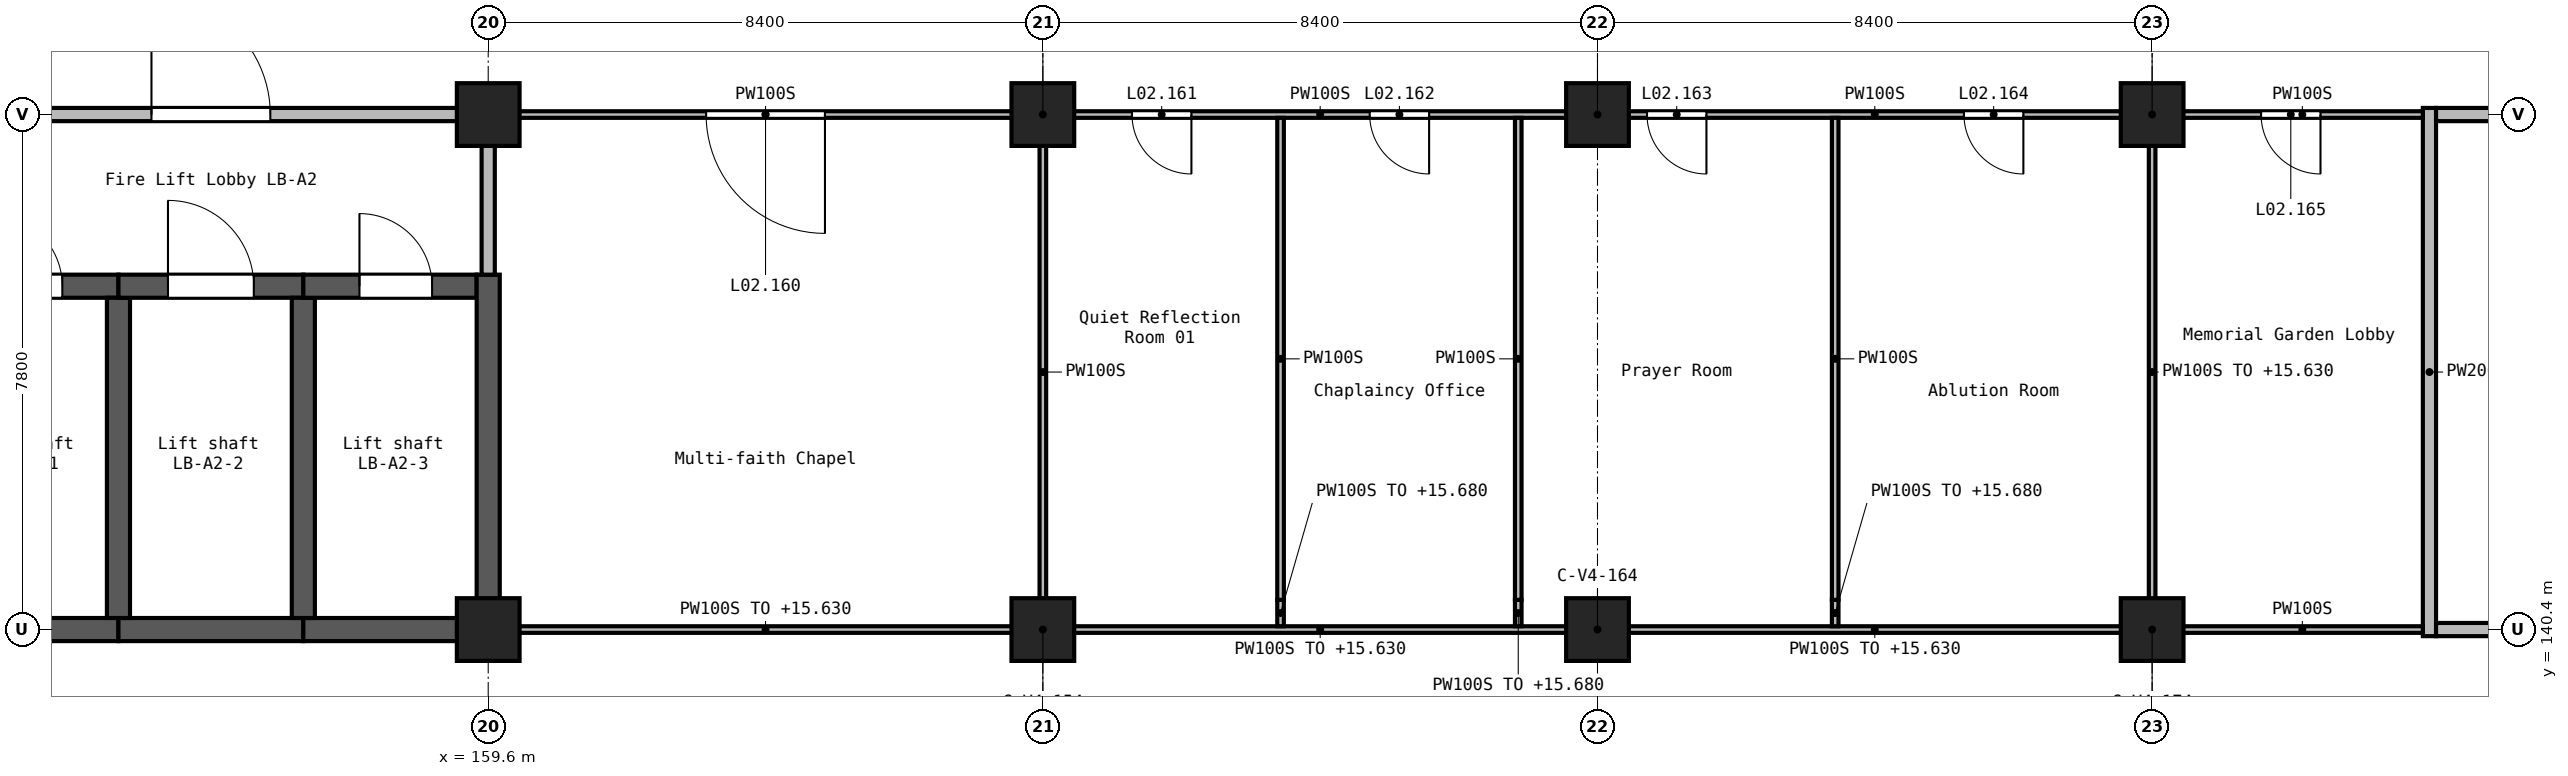
"""IFC4 building model, lengths in metres.
Left out: names, types, materials, properties, quantities, classifications, styles, units other than length and angle.
Written with IfcOpenShell. Run it as: python <this file> out.ifc"""

import sys

from ifc_helpers import new_model, si_unit, direction, frame, frame_2d, origin, origin_2d, place, context, subcontext, project, spatial, rectangle, extrude, element, fill, save


model = new_model("IFC4")
c1 = context("Model", 3, precision=1e-05, world=origin(), true_north=direction((0.0, 1.0)))
c2 = subcontext(c1, "Body", "Model", "MODEL_VIEW")
j1 = project(units=[si_unit("LENGTHUNIT", "METRE"), si_unit("PLANEANGLEUNIT", "RADIAN")], contexts=[c1])
p1 = place(None, origin())
s1 = spatial("IfcSite", under=j1, at=p1, CompositionType="ELEMENT")
p2 = place(p1, origin())
s2 = spatial("IfcBuilding", under=s1, at=p2, CompositionType="ELEMENT")
p3 = place(p2, frame((0.0, 0.0, 12.6)))
s3 = spatial("IfcBuildingStorey", under=s2, at=p3, CompositionType="ELEMENT", Elevation=12.6)
for number, where, z_axis, x_axis in (
    (1, (159.6, 140.4, 0.0), (0.0, 0.0, 1.0), (1.0, 0.0, 0.0)),
    (2, (159.6, 148.2, 0.0), (0.0, 0.0, 1.0), (1.0, 0.0, 0.0)),
    (3, (168.0, 140.4, 0.0), (0.0, 0.0, 1.0), (1.0, 0.0, 0.0)),
    (4, (168.0, 148.2, 0.0), (0.0, 0.0, 1.0), (1.0, 0.0, 0.0)),
    (5, (176.4, 140.4, 0.0), (0.0, 0.0, 1.0), (1.0, 0.0, 0.0)),
    (6, (176.4, 148.2, 0.0), (0.0, 0.0, 1.0), (1.0, 0.0, 0.0)),
    (7, (184.8, 140.4, 0.0), (0.0, 0.0, 1.0), (1.0, 0.0, 0.0)),
    (8, (184.8, 148.2, 0.0), (0.0, 0.0, 1.0), (1.0, 0.0, 0.0)),
):
    element("IfcColumn", number, at=place(p3, frame(where, z_axis=z_axis, x_axis=x_axis)), inside=s3, PredefinedType="COLUMN", context=c2, shape_type="SweptSolid", body=[
        extrude(rectangle(XDim=0.95, YDim=0.95, at=origin_2d()), origin(), (0.0, 0.0, 1.0), 4.2),
    ])
p4 = place(p3, frame((151.025, 145.6, 0.0), z_axis=(0.0, 0.0, 1.0), x_axis=(1.0, 0.0, 0.0)))
e9 = element("IfcWall", 9, at=p4, inside=s3, PredefinedType="SHEAR", context=c2, shape_type="SweptSolid", body=[
    extrude(rectangle(XDim=2.975, YDim=0.35, at=frame_2d((1.488, 0.0))), origin(), (0.0, 0.0, 1.0), 4.2),
])
p5 = place(p4, frame((1.025, 0.0, 0.0)))
e10 = element("IfcOpeningElement", 10, at=p5, cuts=e9, PredefinedType="OPENING", context=c2, shape_type="SweptSolid", body=[
    extrude(rectangle(XDim=1.1, YDim=2.1, at=frame_2d((0.55, 1.05))), frame((0.0, 0.185, 0.0), z_axis=(0.0, -1.0, 0.0), x_axis=(1.0, 0.0, 0.0)), (0.0, 0.0, 1.0), 0.37),
])
p6 = place(p3, frame((151.375, 140.4, 0.0), z_axis=(0.0, 0.0, 1.0), x_axis=(1.0, 0.0, 0.0)))
e11 = element("IfcWall", 11, at=p6, inside=s3, PredefinedType="SHEAR", context=c2, shape_type="SweptSolid", body=[
    extrude(rectangle(XDim=2.625, YDim=0.35, at=frame_2d((1.312, 0.0))), origin(), (0.0, 0.0, 1.0), 4.2),
])
p7 = place(p3, frame((154.0, 140.4, 0.0), z_axis=(0.0, 0.0, 1.0), x_axis=(1.0, 0.0, 0.0)))
e12 = element("IfcWall", 12, at=p7, inside=s3, PredefinedType="SHEAR", context=c2, shape_type="SweptSolid", body=[
    extrude(rectangle(XDim=2.8, YDim=0.35, at=frame_2d((1.4, 0.0))), origin(), (0.0, 0.0, 1.0), 4.2),
])
p8 = place(p3, frame((154.0, 140.575, 0.0), z_axis=(0.0, 0.0, 1.0), x_axis=(0.0, 1.0, 0.0)))
e13 = element("IfcWall", 13, at=p8, inside=s3, PredefinedType="SHEAR", context=c2, shape_type="SweptSolid", body=[
    extrude(rectangle(XDim=4.85, YDim=0.35, at=frame_2d((2.425, 0.0))), origin(), (0.0, 0.0, 1.0), 4.2),
])
p9 = place(p3, frame((154.0, 145.6, 0.0), z_axis=(0.0, 0.0, 1.0), x_axis=(1.0, 0.0, 0.0)))
e14 = element("IfcWall", 14, at=p9, inside=s3, PredefinedType="SHEAR", context=c2, shape_type="SweptSolid", body=[
    extrude(rectangle(XDim=2.8, YDim=0.35, at=frame_2d((1.4, 0.0))), origin(), (0.0, 0.0, 1.0), 4.2),
])
p10 = place(p9, frame((0.75, 0.0, 0.0)))
e15 = element("IfcOpeningElement", 15, at=p10, cuts=e14, PredefinedType="OPENING", context=c2, shape_type="SweptSolid", body=[
    extrude(rectangle(XDim=1.3, YDim=2.1, at=frame_2d((0.65, 1.05))), frame((0.0, 0.185, 0.0), z_axis=(0.0, -1.0, 0.0), x_axis=(1.0, 0.0, 0.0)), (0.0, 0.0, 1.0), 0.37),
])
p11 = place(p3, frame((156.8, 140.4, 0.0), z_axis=(0.0, 0.0, 1.0), x_axis=(1.0, 0.0, 0.0)))
e16 = element("IfcWall", 16, at=p11, inside=s3, PredefinedType="SHEAR", context=c2, shape_type="SweptSolid", body=[
    extrude(rectangle(XDim=2.625, YDim=0.35, at=frame_2d((1.312, 0.0))), origin(), (0.0, 0.0, 1.0), 4.2),
])
p12 = place(p3, frame((156.8, 140.575, 0.0), z_axis=(0.0, 0.0, 1.0), x_axis=(0.0, 1.0, 0.0)))
e17 = element("IfcWall", 17, at=p12, inside=s3, PredefinedType="SHEAR", context=c2, shape_type="SweptSolid", body=[
    extrude(rectangle(XDim=4.85, YDim=0.35, at=frame_2d((2.425, 0.0))), origin(), (0.0, 0.0, 1.0), 4.2),
])
p13 = place(p3, frame((156.8, 145.6, 0.0), z_axis=(0.0, 0.0, 1.0), x_axis=(1.0, 0.0, 0.0)))
e18 = element("IfcWall", 18, at=p13, inside=s3, PredefinedType="SHEAR", context=c2, shape_type="SweptSolid", body=[
    extrude(rectangle(XDim=2.625, YDim=0.35, at=frame_2d((1.312, 0.0))), origin(), (0.0, 0.0, 1.0), 4.2),
])
p14 = place(p13, frame((0.85, 0.0, 0.0)))
e19 = element("IfcOpeningElement", 19, at=p14, cuts=e18, PredefinedType="OPENING", context=c2, shape_type="SweptSolid", body=[
    extrude(rectangle(XDim=1.1, YDim=2.1, at=frame_2d((0.55, 1.05))), frame((0.0, 0.185, 0.0), z_axis=(0.0, -1.0, 0.0), x_axis=(1.0, 0.0, 0.0)), (0.0, 0.0, 1.0), 0.37),
])
p15 = place(p3, frame((159.6, 140.225, 0.0), z_axis=(0.0, 0.0, 1.0), x_axis=(0.0, 1.0, 0.0)))
e20 = element("IfcWall", 20, at=p15, inside=s3, PredefinedType="SHEAR", context=c2, shape_type="SweptSolid", body=[
    extrude(rectangle(XDim=5.55, YDim=0.35, at=frame_2d((2.775, 0.0))), origin(), (0.0, 0.0, 1.0), 4.2),
])
p16 = place(p3, frame((151.65, 148.2, 0.0), z_axis=(0.0, 0.0, 1.0), x_axis=(1.0, 0.0, 0.0)))
e21 = element("IfcWall", 21, at=p16, inside=s3, PredefinedType="SOLIDWALL", context=c2, shape_type="SweptSolid", body=[
    extrude(rectangle(XDim=7.5, YDim=0.2, at=frame_2d((3.75, 0.0))), origin(), (0.0, 0.0, 1.0), 3.85),
])
p17 = place(p16, frame((2.85, 0.0, 0.0)))
e22 = element("IfcOpeningElement", 22, at=p17, cuts=e21, PredefinedType="OPENING", context=c2, shape_type="SweptSolid", body=[
    extrude(rectangle(XDim=1.8, YDim=2.1, at=frame_2d((0.9, 1.05))), frame((0.0, 0.11, 0.0), z_axis=(0.0, -1.0, 0.0), x_axis=(1.0, 0.0, 0.0)), (0.0, 0.0, 1.0), 0.22),
])
p18 = place(p3, frame((189.0, 140.3, 0.0), z_axis=(0.0, 0.0, 1.0), x_axis=(0.0, 1.0, 0.0)))
e23 = element("IfcWall", 23, at=p18, inside=s3, PredefinedType="SOLIDWALL", context=c2, shape_type="SweptSolid", body=[
    extrude(rectangle(XDim=8.0, YDim=0.2, at=frame_2d((4.0, 0.0))), origin(), (0.0, 0.0, 1.0), 3.85),
])
p19 = place(p3, frame((189.1, 140.4, 0.0), z_axis=(0.0, 0.0, 1.0), x_axis=(1.0, 0.0, 0.0)))
e24 = element("IfcWall", 24, at=p19, inside=s3, PredefinedType="SOLIDWALL", context=c2, shape_type="SweptSolid", body=[
    extrude(rectangle(XDim=3.65, YDim=0.2, at=frame_2d((1.825, 0.0))), origin(), (0.0, 0.0, 1.0), 3.85),
])
p20 = place(p3, frame((189.1, 148.2, 0.0), z_axis=(0.0, 0.0, 1.0), x_axis=(1.0, 0.0, 0.0)))
e25 = element("IfcWall", 25, at=p20, inside=s3, PredefinedType="SOLIDWALL", context=c2, shape_type="SweptSolid", body=[
    extrude(rectangle(XDim=3.65, YDim=0.2, at=frame_2d((1.825, 0.0))), origin(), (0.0, 0.0, 1.0), 3.85),
])
p21 = place(p20, frame((1.5, 0.0, 0.0)))
e26 = element("IfcOpeningElement", 26, at=p21, cuts=e25, PredefinedType="OPENING", context=c2, shape_type="SweptSolid", body=[
    extrude(rectangle(XDim=1.0, YDim=2.1, at=frame_2d((0.5, 1.05))), frame((0.0, 0.11, 0.0), z_axis=(0.0, -1.0, 0.0), x_axis=(1.0, 0.0, 0.0)), (0.0, 0.0, 1.0), 0.22),
])
p22 = place(p3, frame((159.6, 145.775, 0.0), z_axis=(0.0, 0.0, 1.0), x_axis=(0.0, 1.0, 0.0)))
e27 = element("IfcWall", 27, at=p22, inside=s3, PredefinedType="SOLIDWALL", context=c2, shape_type="SweptSolid", body=[
    extrude(rectangle(XDim=1.975, YDim=0.2, at=frame_2d((0.988, 0.0))), origin(), (0.0, 0.0, 1.0), 3.85),
])
p23 = place(p3, frame((188.9, 140.4, 0.0), z_axis=(0.0, 0.0, 1.0), x_axis=(-1.0, 0.0, 0.0)))
e28 = element("IfcWall", 28, at=p23, inside=s3, PredefinedType="PARTITIONING", context=c2, shape_type="SweptSolid", body=[
    extrude(rectangle(XDim=3.65, YDim=0.1, at=frame_2d((1.825, 0.0))), origin(), (0.0, 0.0, 1.0), 3.85),
])
for number, where, z_axis, x_axis in (
    (29, (184.35, 140.4, 0.0), (0.0, 0.0, 1.0), (-1.0, 0.0, 0.0)),
    (30, (175.95, 140.4, 0.0), (0.0, 0.0, 1.0), (-1.0, 0.0, 0.0)),
    (31, (167.55, 140.4, 0.0), (0.0, 0.0, 1.0), (-1.0, 0.0, 0.0)),
):
    element("IfcWall", number, at=place(p3, frame(where, z_axis=z_axis, x_axis=x_axis)), inside=s3, PredefinedType="PARTITIONING", context=c2, shape_type="SweptSolid", body=[
        extrude(rectangle(XDim=7.5, YDim=0.1, at=frame_2d((3.75, 0.0))), origin(), (0.0, 0.0, 1.0), 3.03),
    ])
p24 = place(p3, frame((188.9, 148.2, 0.0), z_axis=(0.0, 0.0, 1.0), x_axis=(-1.0, 0.0, 0.0)))
e32 = element("IfcWall", 32, at=p24, inside=s3, PredefinedType="PARTITIONING", context=c2, shape_type="SweptSolid", body=[
    extrude(rectangle(XDim=3.65, YDim=0.1, at=frame_2d((1.825, 0.0))), origin(), (0.0, 0.0, 1.0), 3.85),
])
p25 = place(p24, frame((1.55, 0.0, 0.0)))
e33 = element("IfcOpeningElement", 33, at=p25, cuts=e32, PredefinedType="OPENING", context=c2, shape_type="SweptSolid", body=[
    extrude(rectangle(XDim=0.9, YDim=2.1, at=frame_2d((0.45, 1.05))), frame((0.0, 0.06, 0.0), z_axis=(0.0, -1.0, 0.0), x_axis=(1.0, 0.0, 0.0)), (0.0, 0.0, 1.0), 0.12),
])
p26 = place(p3, frame((184.35, 148.2, 0.0), z_axis=(0.0, 0.0, 1.0), x_axis=(-1.0, 0.0, 0.0)))
e34 = element("IfcWall", 34, at=p26, inside=s3, PredefinedType="PARTITIONING", context=c2, shape_type="SweptSolid", body=[
    extrude(rectangle(XDim=7.5, YDim=0.1, at=frame_2d((3.75, 0.0))), origin(), (0.0, 0.0, 1.0), 3.85),
])
p27 = place(p26, frame((6.3, 0.0, 0.0)))
e35 = element("IfcOpeningElement", 35, at=p27, cuts=e34, PredefinedType="OPENING", context=c2, shape_type="SweptSolid", body=[
    extrude(rectangle(XDim=0.9, YDim=2.1, at=frame_2d((0.45, 1.05))), frame((0.0, 0.06, 0.0), z_axis=(0.0, -1.0, 0.0), x_axis=(1.0, 0.0, 0.0)), (0.0, 0.0, 1.0), 0.12),
])
p28 = place(p26, frame((1.5, 0.0, 0.0)))
e36 = element("IfcOpeningElement", 36, at=p28, cuts=e34, PredefinedType="OPENING", context=c2, shape_type="SweptSolid", body=[
    extrude(rectangle(XDim=0.9, YDim=2.1, at=frame_2d((0.45, 1.05))), frame((0.0, 0.06, 0.0), z_axis=(0.0, -1.0, 0.0), x_axis=(1.0, 0.0, 0.0)), (0.0, 0.0, 1.0), 0.12),
])
p29 = place(p3, frame((175.95, 148.2, 0.0), z_axis=(0.0, 0.0, 1.0), x_axis=(-1.0, 0.0, 0.0)))
e37 = element("IfcWall", 37, at=p29, inside=s3, PredefinedType="PARTITIONING", context=c2, shape_type="SweptSolid", body=[
    extrude(rectangle(XDim=7.5, YDim=0.1, at=frame_2d((3.75, 0.0))), origin(), (0.0, 0.0, 1.0), 3.85),
])
p30 = place(p29, frame((5.7, 0.0, 0.0)))
e38 = element("IfcOpeningElement", 38, at=p30, cuts=e37, PredefinedType="OPENING", context=c2, shape_type="SweptSolid", body=[
    extrude(rectangle(XDim=0.9, YDim=2.1, at=frame_2d((0.45, 1.05))), frame((0.0, 0.06, 0.0), z_axis=(0.0, -1.0, 0.0), x_axis=(1.0, 0.0, 0.0)), (0.0, 0.0, 1.0), 0.12),
])
p31 = place(p29, frame((2.1, 0.0, 0.0)))
e39 = element("IfcOpeningElement", 39, at=p31, cuts=e37, PredefinedType="OPENING", context=c2, shape_type="SweptSolid", body=[
    extrude(rectangle(XDim=0.9, YDim=2.1, at=frame_2d((0.45, 1.05))), frame((0.0, 0.06, 0.0), z_axis=(0.0, -1.0, 0.0), x_axis=(1.0, 0.0, 0.0)), (0.0, 0.0, 1.0), 0.12),
])
p32 = place(p3, frame((167.55, 148.2, 0.0), z_axis=(0.0, 0.0, 1.0), x_axis=(-1.0, 0.0, 0.0)))
e40 = element("IfcWall", 40, at=p32, inside=s3, PredefinedType="PARTITIONING", context=c2, shape_type="SweptSolid", body=[
    extrude(rectangle(XDim=7.5, YDim=0.1, at=frame_2d((3.75, 0.0))), origin(), (0.0, 0.0, 1.0), 3.85),
])
p33 = place(p32, frame((2.85, 0.0, 0.0)))
e41 = element("IfcOpeningElement", 41, at=p33, cuts=e40, PredefinedType="OPENING", context=c2, shape_type="SweptSolid", body=[
    extrude(rectangle(XDim=1.8, YDim=2.1, at=frame_2d((0.9, 1.05))), frame((0.0, 0.06, 0.0), z_axis=(0.0, -1.0, 0.0), x_axis=(1.0, 0.0, 0.0)), (0.0, 0.0, 1.0), 0.12),
])
p34 = place(p3, frame((168.0, 140.85, 0.0), z_axis=(0.0, 0.0, 1.0), x_axis=(0.0, 1.0, 0.0)))
e42 = element("IfcWall", 42, at=p34, inside=s3, PredefinedType="PARTITIONING", context=c2, shape_type="SweptSolid", body=[
    extrude(rectangle(XDim=6.9, YDim=0.1, at=frame_2d((3.45, 0.0))), origin(), (0.0, 0.0, 1.0), 3.85),
])
p35 = place(p3, frame((171.6, 140.45, 0.0), z_axis=(0.0, 0.0, 1.0), x_axis=(0.0, 1.0, 0.0)))
e43 = element("IfcWall", 43, at=p35, inside=s3, PredefinedType="PARTITIONING", context=c2, shape_type="SweptSolid", body=[
    extrude(rectangle(XDim=0.4, YDim=0.1, at=frame_2d((0.2, 0.0))), origin(), (0.0, 0.0, 1.0), 3.08),
])
p36 = place(p3, frame((171.6, 140.85, 0.0), z_axis=(0.0, 0.0, 1.0), x_axis=(0.0, 1.0, 0.0)))
e44 = element("IfcWall", 44, at=p36, inside=s3, PredefinedType="PARTITIONING", context=c2, shape_type="SweptSolid", body=[
    extrude(rectangle(XDim=7.3, YDim=0.1, at=frame_2d((3.65, 0.0))), origin(), (0.0, 0.0, 1.0), 3.85),
])
p37 = place(p3, frame((175.2, 140.45, 0.0), z_axis=(0.0, 0.0, 1.0), x_axis=(0.0, 1.0, 0.0)))
e45 = element("IfcWall", 45, at=p37, inside=s3, PredefinedType="PARTITIONING", context=c2, shape_type="SweptSolid", body=[
    extrude(rectangle(XDim=0.4, YDim=0.1, at=frame_2d((0.2, 0.0))), origin(), (0.0, 0.0, 1.0), 3.08),
])
p38 = place(p3, frame((175.2, 140.85, 0.0), z_axis=(0.0, 0.0, 1.0), x_axis=(0.0, 1.0, 0.0)))
e46 = element("IfcWall", 46, at=p38, inside=s3, PredefinedType="PARTITIONING", context=c2, shape_type="SweptSolid", body=[
    extrude(rectangle(XDim=7.3, YDim=0.1, at=frame_2d((3.65, 0.0))), origin(), (0.0, 0.0, 1.0), 3.85),
])
p39 = place(p3, frame((180.0, 140.45, 0.0), z_axis=(0.0, 0.0, 1.0), x_axis=(0.0, 1.0, 0.0)))
e47 = element("IfcWall", 47, at=p39, inside=s3, PredefinedType="PARTITIONING", context=c2, shape_type="SweptSolid", body=[
    extrude(rectangle(XDim=0.4, YDim=0.1, at=frame_2d((0.2, 0.0))), origin(), (0.0, 0.0, 1.0), 3.08),
])
p40 = place(p3, frame((180.0, 140.85, 0.0), z_axis=(0.0, 0.0, 1.0), x_axis=(0.0, 1.0, 0.0)))
e48 = element("IfcWall", 48, at=p40, inside=s3, PredefinedType="PARTITIONING", context=c2, shape_type="SweptSolid", body=[
    extrude(rectangle(XDim=7.3, YDim=0.1, at=frame_2d((3.65, 0.0))), origin(), (0.0, 0.0, 1.0), 3.85),
])
p41 = place(p3, frame((184.8, 140.85, 0.0), z_axis=(0.0, 0.0, 1.0), x_axis=(0.0, 1.0, 0.0)))
e49 = element("IfcWall", 49, at=p41, inside=s3, PredefinedType="PARTITIONING", context=c2, shape_type="SweptSolid", body=[
    extrude(rectangle(XDim=6.9, YDim=0.1, at=frame_2d((3.45, 0.0))), origin(), (0.0, 0.0, 1.0), 3.03),
])
p42 = place(p17, frame((1.8, 0.0, 0.0), z_axis=(0.0, 0.0, 1.0), x_axis=(-1.0, 0.0, 0.0)))
e50 = element("IfcDoor", 50, at=p42, inside=s3, OperationType="DOUBLE_DOOR_SINGLE_SWING", PredefinedType="DOOR", context=c2, shape_type="SweptSolid", body=[
    extrude(rectangle(XDim=1.8, YDim=2.1, at=frame_2d((0.9, 1.05))), frame((0.0, 0.025, 0.0), z_axis=(0.0, -1.0, 0.0), x_axis=(1.0, 0.0, 0.0)), (0.0, 0.0, 1.0), 0.05),
])
fill(e22, e50)
p43 = place(p33, origin())
e51 = element("IfcDoor", 51, at=p43, inside=s3, OperationType="DOUBLE_DOOR_SINGLE_SWING", PredefinedType="DOOR", context=c2, shape_type="SweptSolid", body=[
    extrude(rectangle(XDim=1.8, YDim=2.1, at=frame_2d((0.9, 1.05))), frame((0.0, 0.025, 0.0), z_axis=(0.0, -1.0, 0.0), x_axis=(1.0, 0.0, 0.0)), (0.0, 0.0, 1.0), 0.05),
])
fill(e41, e51)
p44 = place(p30, origin())
e52 = element("IfcDoor", 52, at=p44, inside=s3, OperationType="SINGLE_SWING_RIGHT", PredefinedType="DOOR", context=c2, shape_type="SweptSolid", body=[
    extrude(rectangle(XDim=0.9, YDim=2.1, at=frame_2d((0.45, 1.05))), frame((0.0, 0.025, 0.0), z_axis=(0.0, -1.0, 0.0), x_axis=(1.0, 0.0, 0.0)), (0.0, 0.0, 1.0), 0.05),
])
fill(e38, e52)
p45 = place(p31, origin())
e53 = element("IfcDoor", 53, at=p45, inside=s3, OperationType="SINGLE_SWING_LEFT", PredefinedType="DOOR", context=c2, shape_type="SweptSolid", body=[
    extrude(rectangle(XDim=0.9, YDim=2.1, at=frame_2d((0.45, 1.05))), frame((0.0, 0.025, 0.0), z_axis=(0.0, -1.0, 0.0), x_axis=(1.0, 0.0, 0.0)), (0.0, 0.0, 1.0), 0.05),
])
fill(e39, e53)
p46 = place(p27, origin())
e54 = element("IfcDoor", 54, at=p46, inside=s3, OperationType="SINGLE_SWING_RIGHT", PredefinedType="DOOR", context=c2, shape_type="SweptSolid", body=[
    extrude(rectangle(XDim=0.9, YDim=2.1, at=frame_2d((0.45, 1.05))), frame((0.0, 0.025, 0.0), z_axis=(0.0, -1.0, 0.0), x_axis=(1.0, 0.0, 0.0)), (0.0, 0.0, 1.0), 0.05),
])
fill(e35, e54)
p47 = place(p28, origin())
e55 = element("IfcDoor", 55, at=p47, inside=s3, OperationType="SINGLE_SWING_LEFT", PredefinedType="DOOR", context=c2, shape_type="SweptSolid", body=[
    extrude(rectangle(XDim=0.9, YDim=2.1, at=frame_2d((0.45, 1.05))), frame((0.0, 0.025, 0.0), z_axis=(0.0, -1.0, 0.0), x_axis=(1.0, 0.0, 0.0)), (0.0, 0.0, 1.0), 0.05),
])
fill(e36, e55)
p48 = place(p25, origin())
e56 = element("IfcDoor", 56, at=p48, inside=s3, OperationType="SINGLE_SWING_RIGHT", PredefinedType="DOOR", context=c2, shape_type="SweptSolid", body=[
    extrude(rectangle(XDim=0.9, YDim=2.1, at=frame_2d((0.45, 1.05))), frame((0.0, 0.025, 0.0), z_axis=(0.0, -1.0, 0.0), x_axis=(1.0, 0.0, 0.0)), (0.0, 0.0, 1.0), 0.05),
])
fill(e33, e56)
p49 = place(p5, origin())
e57 = element("IfcDoor", 57, at=p49, inside=s3, OperationType="DOUBLE_DOOR_SLIDING", PredefinedType="DOOR", context=c2, shape_type="SweptSolid", body=[
    extrude(rectangle(XDim=1.1, YDim=2.1, at=frame_2d((0.55, 1.05))), frame((0.0, 0.025, 0.0), z_axis=(0.0, -1.0, 0.0), x_axis=(1.0, 0.0, 0.0)), (0.0, 0.0, 1.0), 0.05),
])
fill(e10, e57)
p50 = place(p10, origin())
e58 = element("IfcDoor", 58, at=p50, inside=s3, OperationType="DOUBLE_DOOR_SLIDING", PredefinedType="DOOR", context=c2, shape_type="SweptSolid", body=[
    extrude(rectangle(XDim=1.3, YDim=2.1, at=frame_2d((0.65, 1.05))), frame((0.0, 0.025, 0.0), z_axis=(0.0, -1.0, 0.0), x_axis=(1.0, 0.0, 0.0)), (0.0, 0.0, 1.0), 0.05),
])
fill(e15, e58)
p51 = place(p14, origin())
e59 = element("IfcDoor", 59, at=p51, inside=s3, OperationType="DOUBLE_DOOR_SLIDING", PredefinedType="DOOR", context=c2, shape_type="SweptSolid", body=[
    extrude(rectangle(XDim=1.1, YDim=2.1, at=frame_2d((0.55, 1.05))), frame((0.0, 0.025, 0.0), z_axis=(0.0, -1.0, 0.0), x_axis=(1.0, 0.0, 0.0)), (0.0, 0.0, 1.0), 0.05),
])
fill(e19, e59)
save(model, sys.argv[1])
